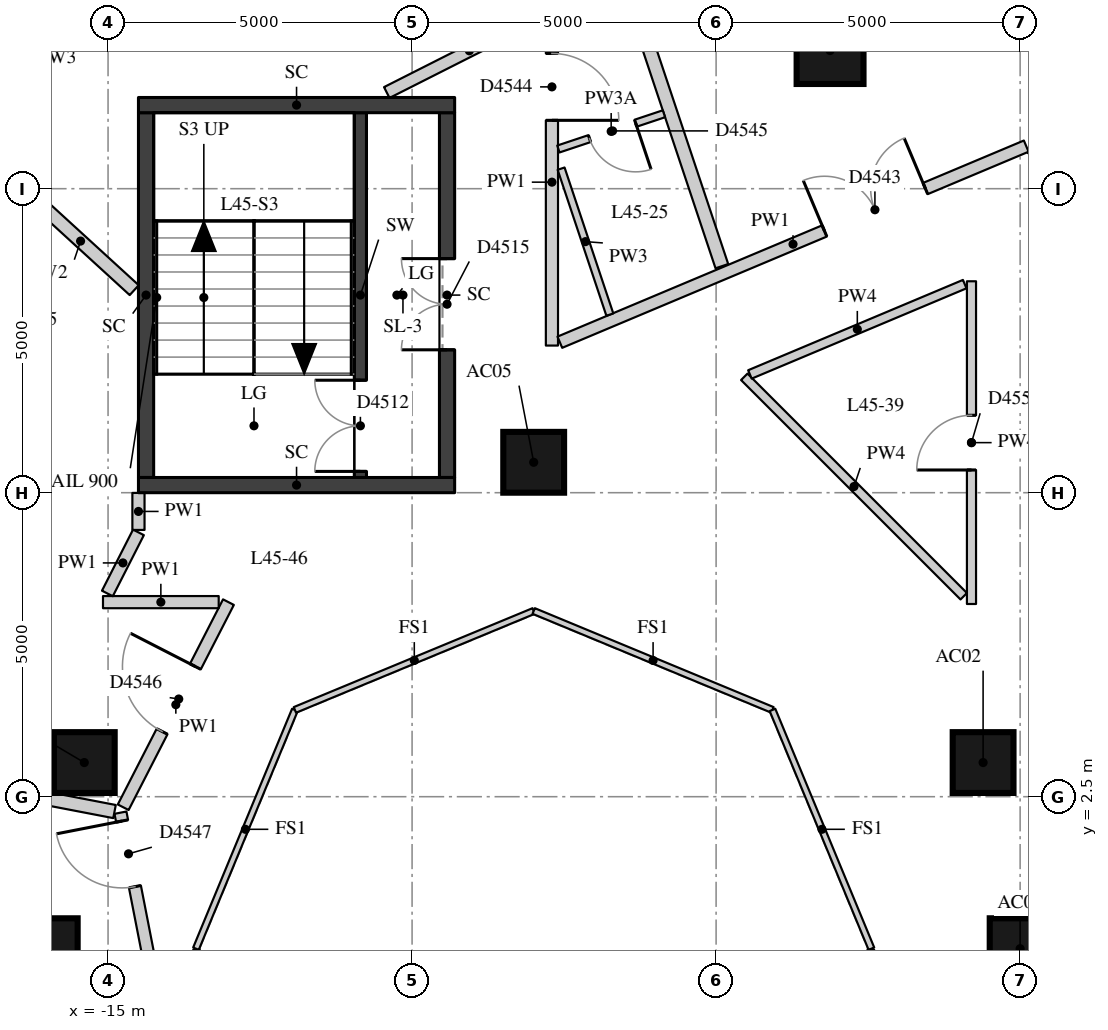
"""IFC4 building model, lengths in metres.
Left out: names, types, materials, properties, quantities, classifications, styles, units other than length and angle.
Written with IfcOpenShell. Run it as: python <this file> out.ifc"""

import sys

from ifc_helpers import new_model, si_unit, direction, frame, frame_2d, origin, origin_2d, place, context, subcontext, project, spatial, rectangle, extrude, element, fill, save


model = new_model("IFC4")
c1 = context("Model", 3, precision=1e-05, world=origin(), true_north=direction((0.0, 1.0)))
c2 = subcontext(c1, "Body", "Model", "MODEL_VIEW")
j1 = project(units=[si_unit("LENGTHUNIT", "METRE"), si_unit("PLANEANGLEUNIT", "RADIAN")], contexts=[c1])
p1 = place(None, origin())
s1 = spatial("IfcSite", under=j1, at=p1, CompositionType="ELEMENT")
p2 = place(p1, origin())
s2 = spatial("IfcBuilding", under=s1, at=p2, CompositionType="ELEMENT")
p3 = place(p2, frame((0.0, 0.0, 161.6)))
s3 = spatial("IfcBuildingStorey", under=s2, at=p3, CompositionType="ELEMENT", Elevation=161.6)
for number, where, z_axis, x_axis in (
    (1, (0.0, 0.0, 0.0), (0.0, 0.0, 1.0), (1.0, 0.0, 0.0)),
    (2, (-0.609, 3.062, 0.0), (0.0, 0.0, 1.0), (1.0, 0.0, 0.0)),
    (3, (-8.0, 8.0, 0.0), (0.0, 0.0, 1.0), (1.0, 0.0, 0.0)),
    (4, (-15.391, 3.062, 0.0), (0.0, 0.0, 1.0), (1.0, 0.0, 0.0)),
    (5, (-16.0, 0.0, 0.0), (0.0, 0.0, 1.0), (1.0, 0.0, 0.0)),
):
    element("IfcColumn", number, at=place(p3, frame(where, z_axis=z_axis, x_axis=x_axis)), inside=s3, PredefinedType="COLUMN", context=c2, shape_type="SweptSolid", body=[
        extrude(rectangle(XDim=1.0, YDim=1.0, at=origin_2d()), origin(), (0.0, 0.0, 1.0), 3.3),
    ])
p4 = place(p3, frame((-3.126, 14.772, 0.0), z_axis=(0.0, 0.0, 1.0), x_axis=(1.0, 0.0, 0.0)))
e6 = element("IfcColumn", 6, at=p4, inside=s3, PredefinedType="COLUMN", context=c2, shape_type="SweptSolid", body=[
    extrude(rectangle(XDim=1.1, YDim=1.1, at=origin_2d()), origin(), (0.0, 0.0, 1.0), 3.3),
])
p5 = place(p3, frame((-15.63, 16.639, 0.0), z_axis=(0.0, 0.0, 1.0), x_axis=(-0.737808755941, -0.675009807082, 0.0)))
e7 = element("IfcWall", 7, at=p5, inside=s3, PredefinedType="SOLIDWALL", context=c2, shape_type="SweptSolid", body=[
    extrude(rectangle(XDim=3.094, YDim=0.45, at=frame_2d((1.547, 0.0))), origin(), (0.0, 0.0, 1.0), 3.02),
])
p6 = place(p5, frame((0.747, 0.0, 0.4)))
e8 = element("IfcOpeningElement", 8, at=p6, cuts=e7, PredefinedType="OPENING", context=c2, shape_type="SweptSolid", body=[
    extrude(rectangle(XDim=1.6, YDim=1.75, at=frame_2d((0.8, 0.875))), frame((0.0, 0.235, 0.0), z_axis=(0.0, -1.0, 0.0), x_axis=(1.0, 0.0, 0.0)), (0.0, 0.0, 1.0), 0.47),
])
p7 = place(p3, frame((-10.85, 7.75, 0.0), z_axis=(0.0, 0.0, 1.0), x_axis=(0.0, 1.0, 0.0)))
e9 = element("IfcWall", 9, at=p7, inside=s3, PredefinedType="SHEAR", context=c2, shape_type="SweptSolid", body=[
    extrude(rectangle(XDim=6.0, YDim=0.2, at=frame_2d((3.0, 0.0))), origin(), (0.0, 0.0, 1.0), 3.02),
])
p8 = place(p7, frame((0.1, 0.0, 0.0)))
e10 = element("IfcOpeningElement", 10, at=p8, cuts=e9, PredefinedType="OPENING", context=c2, shape_type="SweptSolid", body=[
    extrude(rectangle(XDim=1.5, YDim=2.1, at=frame_2d((0.75, 1.05))), frame((0.0, 0.11, 0.0), z_axis=(0.0, -1.0, 0.0), x_axis=(1.0, 0.0, 0.0)), (0.0, 0.0, 1.0), 0.22),
])
p9 = place(p3, frame((-14.375, 7.75, -0.28), z_axis=(0.0, 0.0, 1.0), x_axis=(0.0, 1.0, 0.0)))
e11 = element("IfcWall", 11, at=p9, inside=s3, PredefinedType="SHEAR", context=c2, shape_type="SweptSolid", body=[
    extrude(rectangle(XDim=6.0, YDim=0.25, at=frame_2d((3.0, 0.0))), origin(), (0.0, 0.0, 1.0), 3.3),
])
p10 = place(p3, frame((-9.425, 7.75, -0.28), z_axis=(0.0, 0.0, 1.0), x_axis=(0.0, 1.0, 0.0)))
e12 = element("IfcWall", 12, at=p10, inside=s3, PredefinedType="SHEAR", context=c2, shape_type="SweptSolid", body=[
    extrude(rectangle(XDim=6.0, YDim=0.25, at=frame_2d((3.0, 0.0))), origin(), (0.0, 0.0, 1.0), 3.3),
])
p11 = place(p10, frame((2.1, 0.0, 0.28)))
e13 = element("IfcOpeningElement", 13, at=p11, cuts=e12, PredefinedType="OPENING", context=c2, shape_type="SweptSolid", body=[
    extrude(rectangle(XDim=1.5, YDim=2.1, at=frame_2d((0.75, 1.05))), frame((0.0, 0.135, 0.0), z_axis=(0.0, -1.0, 0.0), x_axis=(1.0, 0.0, 0.0)), (0.0, 0.0, 1.0), 0.27),
])
for number, where, z_axis, x_axis in (
    (14, (-14.5, 13.875, -0.28), (0.0, 0.0, 1.0), (1.0, 0.0, 0.0)),
    (15, (-14.5, 7.625, -0.28), (0.0, 0.0, 1.0), (1.0, 0.0, 0.0)),
):
    element("IfcWall", number, at=place(p3, frame(where, z_axis=z_axis, x_axis=x_axis)), inside=s3, PredefinedType="SHEAR", context=c2, shape_type="SweptSolid", body=[
        extrude(rectangle(XDim=5.2, YDim=0.25, at=frame_2d((2.6, 0.0))), origin(), (0.0, 0.0, 1.0), 3.3),
    ])
p12 = place(p3, frame((-13.268, -5.583, 0.0), z_axis=(0.0, 0.0, 1.0), x_axis=(-0.191747927029, 0.981444207523, 0.0)))
e16 = element("IfcWall", 16, at=p12, inside=s3, PredefinedType="PARTITIONING", context=c2, shape_type="SweptSolid", body=[
    extrude(rectangle(XDim=7.968, YDim=0.2, at=frame_2d((3.984, 0.0))), origin(), (0.0, 0.0, 1.0), 3.02),
])
p13 = place(p12, frame((6.728, 0.0, 0.0)))
e17 = element("IfcOpeningElement", 17, at=p13, cuts=e16, PredefinedType="OPENING", context=c2, shape_type="SweptSolid", body=[
    extrude(rectangle(XDim=1.1, YDim=2.1, at=frame_2d((0.55, 1.05))), frame((0.0, 0.11, 0.0), z_axis=(0.0, -1.0, 0.0), x_axis=(1.0, 0.0, 0.0)), (0.0, 0.0, 1.0), 0.22),
])
p14 = place(p3, frame((-14.751, 2.326, 0.0), z_axis=(0.0, 0.0, 1.0), x_axis=(0.456461745611, 0.889743038632, 0.0)))
e18 = element("IfcWall", 18, at=p14, inside=s3, PredefinedType="PARTITIONING", context=c2, shape_type="SweptSolid", body=[
    extrude(rectangle(XDim=3.792, YDim=0.2, at=frame_2d((1.896, 0.0))), origin(), (0.0, 0.0, 1.0), 3.02),
])
p15 = place(p14, frame((1.401, 0.0, 0.0)))
e19 = element("IfcOpeningElement", 19, at=p15, cuts=e18, PredefinedType="OPENING", context=c2, shape_type="SweptSolid", body=[
    extrude(rectangle(XDim=1.2, YDim=2.1, at=frame_2d((0.6, 1.05))), frame((0.0, 0.11, 0.0), z_axis=(0.0, -1.0, 0.0), x_axis=(1.0, 0.0, 0.0)), (0.0, 0.0, 1.0), 0.22),
])
p16 = place(p3, frame((-13.18, 5.7, 0.0), z_axis=(0.0, 0.0, 1.0), x_axis=(-1.0, 0.0, 0.0)))
e20 = element("IfcWall", 20, at=p16, inside=s3, PredefinedType="PARTITIONING", context=c2, shape_type="SweptSolid", body=[
    extrude(rectangle(XDim=1.903, YDim=0.2, at=frame_2d((0.952, 0.0))), origin(), (0.0, 0.0, 1.0), 3.02),
])
p17 = place(p3, frame((-15.011, 5.843, 0.0), z_axis=(0.0, 0.0, 1.0), x_axis=(0.453267091839, 0.891374749169, 0.0)))
e21 = element("IfcWall", 21, at=p17, inside=s3, PredefinedType="PARTITIONING", context=c2, shape_type="SweptSolid", body=[
    extrude(rectangle(XDim=1.127, YDim=0.2, at=frame_2d((0.564, 0.0))), origin(), (0.0, 0.0, 1.0), 3.02),
])
p18 = place(p3, frame((-14.5, 6.887, 0.0), z_axis=(0.0, 0.0, 1.0), x_axis=(0.0, 1.0, 0.0)))
e22 = element("IfcWall", 22, at=p18, inside=s3, PredefinedType="PARTITIONING", context=c2, shape_type="SweptSolid", body=[
    extrude(rectangle(XDim=0.609, YDim=0.2, at=frame_2d((0.304, 0.0))), origin(), (0.0, 0.0, 1.0), 3.02),
])
p19 = place(p3, frame((-10.416, 14.082, 0.0), z_axis=(0.0, 0.0, 1.0), x_axis=(0.892396808139, 0.451251522793, 0.0)))
e23 = element("IfcWall", 23, at=p19, inside=s3, PredefinedType="PARTITIONING", context=c2, shape_type="SweptSolid", body=[
    extrude(rectangle(XDim=3.044, YDim=0.2, at=frame_2d((1.522, 0.0))), origin(), (0.0, 0.0, 1.0), 3.02),
])
p20 = place(p3, frame((-7.7, 15.295, 0.0), z_axis=(0.0, 0.0, 1.0), x_axis=(0.0, -1.0, 0.0)))
e24 = element("IfcWall", 24, at=p20, inside=s3, PredefinedType="PARTITIONING", context=c2, shape_type="SweptSolid", body=[
    extrude(rectangle(XDim=5.375, YDim=0.2, at=frame_2d((2.688, 0.0))), origin(), (0.0, 0.0, 1.0), 3.02),
])
p21 = place(p20, frame((0.57, 0.0, 0.0)))
e25 = element("IfcOpeningElement", 25, at=p21, cuts=e24, PredefinedType="OPENING", context=c2, shape_type="SweptSolid", body=[
    extrude(rectangle(XDim=1.1, YDim=2.1, at=frame_2d((0.55, 1.05))), frame((0.0, 0.11, 0.0), z_axis=(0.0, -1.0, 0.0), x_axis=(1.0, 0.0, 0.0)), (0.0, 0.0, 1.0), 0.22),
])
p22 = place(p3, frame((-7.57, 9.975, 0.0), z_axis=(0.0, 0.0, 1.0), x_axis=(0.921815879705, 0.387628022624, 0.0)))
e26 = element("IfcWall", 26, at=p22, inside=s3, PredefinedType="PARTITIONING", context=c2, shape_type="SweptSolid", body=[
    extrude(rectangle(XDim=8.321, YDim=0.2, at=frame_2d((4.16, 0.0))), origin(), (0.0, 0.0, 1.0), 3.02),
])
p23 = place(p22, frame((4.721, 0.0, 0.0)))
e27 = element("IfcOpeningElement", 27, at=p23, cuts=e26, PredefinedType="OPENING", context=c2, shape_type="SweptSolid", body=[
    extrude(rectangle(XDim=1.8, YDim=2.1, at=frame_2d((0.9, 1.05))), frame((0.0, 0.11, 0.0), z_axis=(0.0, -1.0, 0.0), x_axis=(1.0, 0.0, 0.0)), (0.0, 0.0, 1.0), 0.22),
])
p24 = place(p3, frame((-0.8, 10.977, 0.0), z_axis=(0.0, 0.0, 1.0), x_axis=(0.0, -1.0, 0.0)))
e28 = element("IfcWall", 28, at=p24, inside=s3, PredefinedType="PARTITIONING", context=c2, shape_type="SweptSolid", body=[
    extrude(rectangle(XDim=5.308, YDim=0.15, at=frame_2d((2.654, 0.0))), origin(), (0.0, 0.0, 1.0), 3.02),
])
p25 = place(p24, frame((2.204, 0.0, 0.0)))
e29 = element("IfcOpeningElement", 29, at=p25, cuts=e28, PredefinedType="OPENING", context=c2, shape_type="SweptSolid", body=[
    extrude(rectangle(XDim=0.9, YDim=2.1, at=frame_2d((0.45, 1.05))), frame((0.0, 0.085, 0.0), z_axis=(0.0, -1.0, 0.0), x_axis=(1.0, 0.0, 0.0)), (0.0, 0.0, 1.0), 0.17),
])
p26 = place(p3, frame((-0.927, 5.797, 0.0), z_axis=(0.0, 0.0, 1.0), x_axis=(-0.707106781187, 0.707106781187, 0.0)))
e30 = element("IfcWall", 30, at=p26, inside=s3, PredefinedType="PARTITIONING", context=c2, shape_type="SweptSolid", body=[
    extrude(rectangle(XDim=5.104, YDim=0.15, at=frame_2d((2.552, 0.0))), origin(), (0.0, 0.0, 1.0), 3.02),
])
p27 = place(p3, frame((-4.444, 9.445, 0.0), z_axis=(0.0, 0.0, 1.0), x_axis=(0.921822351054, 0.387612632788, 0.0)))
e31 = element("IfcWall", 31, at=p27, inside=s3, PredefinedType="PARTITIONING", context=c2, shape_type="SweptSolid", body=[
    extrude(rectangle(XDim=3.832, YDim=0.15, at=frame_2d((1.916, 0.0))), origin(), (0.0, 0.0, 1.0), 3.02),
])
p28 = place(p3, frame((-7.683, 19.545, 0.0), z_axis=(0.0, 0.0, 1.0), x_axis=(0.316703700313, -0.948524520615, 0.0)))
e32 = element("IfcWall", 32, at=p28, inside=s3, PredefinedType="PARTITIONING", context=c2, shape_type="SweptSolid", body=[
    extrude(rectangle(XDim=8.771, YDim=0.22, at=frame_2d((4.385, 0.0))), origin(), (0.0, 0.0, 1.0), 3.02),
])
p29 = place(p3, frame((-16.334, 12.445, 0.0), z_axis=(0.0, 0.0, 1.0), x_axis=(0.737857346278, -0.674956692347, 0.0)))
e33 = element("IfcWall", 33, at=p29, inside=s3, PredefinedType="PARTITIONING", context=c2, shape_type="SweptSolid", body=[
    extrude(rectangle(XDim=2.391, YDim=0.22, at=frame_2d((1.195, 0.0))), origin(), (0.0, 0.0, 1.0), 3.02),
])
p30 = place(p3, frame((-20.932, 3.417, 0.0), z_axis=(0.0, 0.0, 1.0), x_axis=(0.9820075798, -0.188841502892, 0.0)))
e34 = element("IfcWall", 34, at=p30, inside=s3, PredefinedType="PARTITIONING", context=c2, shape_type="SweptSolid", body=[
    extrude(rectangle(XDim=6.149, YDim=0.22, at=frame_2d((3.074, 0.0))), origin(), (0.0, 0.0, 1.0), 2.57),
])
p31 = place(p3, frame((-6.748, 10.429, 0.0), z_axis=(0.0, 0.0, 1.0), x_axis=(-0.316690754737, 0.948528842927, 0.0)))
e35 = element("IfcWall", 35, at=p31, inside=s3, PredefinedType="PARTITIONING", context=c2, shape_type="SweptSolid", body=[
    extrude(rectangle(XDim=2.531, YDim=0.12, at=frame_2d((1.266, 0.0))), origin(), (0.0, 0.0, 1.0), 3.02),
])
p32 = place(p3, frame((-7.594, 13.153, 0.0), z_axis=(0.0, 0.0, 1.0), x_axis=(0.948563158378, 0.316587957079, 0.0)))
e36 = element("IfcWall", 36, at=p32, inside=s3, PredefinedType="PARTITIONING", context=c2, shape_type="SweptSolid", body=[
    extrude(rectangle(XDim=1.83, YDim=0.12, at=frame_2d((0.915, 0.0))), origin(), (0.0, 0.0, 1.0), 2.57),
])
p33 = place(p32, frame((0.54, 0.0, 0.0)))
e37 = element("IfcOpeningElement", 37, at=p33, cuts=e36, PredefinedType="OPENING", context=c2, shape_type="SweptSolid", body=[
    extrude(rectangle(XDim=0.8, YDim=2.1, at=frame_2d((0.4, 1.05))), frame((0.0, 0.07, 0.0), z_axis=(0.0, -1.0, 0.0), x_axis=(1.0, 0.0, 0.0)), (0.0, 0.0, 1.0), 0.14),
])
for number, where, z_axis, x_axis in (
    (38, (-2.446, 0.0, 0.0), (0.0, 0.0, 1.0), (-0.383, -0.924, 0.0)),
    (39, (-11.927, -3.927, 0.0), (0.0, 0.0, 1.0), (-0.383, 0.924, 0.0)),
    (40, (-13.554, 0.0, 0.0), (0.0, 0.0, 1.0), (0.383, 0.924, 0.0)),
    (41, (-11.927, 3.927, 0.0), (0.0, 0.0, 1.0), (0.924, 0.383, 0.0)),
    (42, (-8.0, 5.554, 0.0), (0.0, 0.0, 1.0), (0.924, -0.383, 0.0)),
    (43, (-4.073, 3.927, 0.0), (0.0, 0.0, 1.0), (0.383, -0.924, 0.0)),
):
    element("IfcWall", number, at=place(p3, frame(where, z_axis=z_axis, x_axis=x_axis)), inside=s3, PredefinedType="PARTITIONING", context=c2, shape_type="SweptSolid", body=[
        extrude(rectangle(XDim=4.251, YDim=0.1, at=frame_2d((2.125, 0.0))), origin(), (0.0, 0.0, 1.0), 3.02),
    ])
p34 = place(p8, origin())
e44 = element("IfcDoor", 44, at=p34, inside=s3, OperationType="DOUBLE_DOOR_SINGLE_SWING", PredefinedType="DOOR", context=c2, shape_type="SweptSolid", body=[
    extrude(rectangle(XDim=1.5, YDim=2.1, at=frame_2d((0.75, 1.05))), frame((0.0, 0.025, 0.0), z_axis=(0.0, -1.0, 0.0), x_axis=(1.0, 0.0, 0.0)), (0.0, 0.0, 1.0), 0.05),
])
fill(e10, e44)
p35 = place(p11, origin())
e45 = element("IfcDoor", 45, at=p35, inside=s3, OperationType="DOUBLE_DOOR_SINGLE_SWING", PredefinedType="DOOR", context=c2, shape_type="SweptSolid", body=[
    extrude(rectangle(XDim=1.5, YDim=2.1, at=frame_2d((0.75, 1.05))), frame((0.0, 0.025, 0.0), z_axis=(0.0, -1.0, 0.0), x_axis=(1.0, 0.0, 0.0)), (0.0, 0.0, 1.0), 0.05),
])
fill(e13, e45)
p36 = place(p23, origin())
e46 = element("IfcDoor", 46, at=p36, inside=s3, OperationType="DOUBLE_DOOR_SINGLE_SWING", PredefinedType="DOOR", context=c2, shape_type="SweptSolid", body=[
    extrude(rectangle(XDim=1.8, YDim=2.1, at=frame_2d((0.9, 1.05))), frame((0.0, 0.025, 0.0), z_axis=(0.0, -1.0, 0.0), x_axis=(1.0, 0.0, 0.0)), (0.0, 0.0, 1.0), 0.05),
])
fill(e27, e46)
p37 = place(p21, origin())
e47 = element("IfcDoor", 47, at=p37, inside=s3, OperationType="SINGLE_SWING_RIGHT", PredefinedType="DOOR", context=c2, shape_type="SweptSolid", body=[
    extrude(rectangle(XDim=1.1, YDim=2.1, at=frame_2d((0.55, 1.05))), frame((0.0, 0.025, 0.0), z_axis=(0.0, -1.0, 0.0), x_axis=(1.0, 0.0, 0.0)), (0.0, 0.0, 1.0), 0.05),
])
fill(e25, e47)
p38 = place(p33, origin())
e48 = element("IfcDoor", 48, at=p38, inside=s3, OperationType="SINGLE_SWING_LEFT", PredefinedType="DOOR", context=c2, shape_type="SweptSolid", body=[
    extrude(rectangle(XDim=0.8, YDim=2.1, at=frame_2d((0.4, 1.05))), frame((0.0, 0.025, 0.0), z_axis=(0.0, -1.0, 0.0), x_axis=(1.0, 0.0, 0.0)), (0.0, 0.0, 1.0), 0.05),
])
fill(e37, e48)
p39 = place(p15, origin())
e49 = element("IfcDoor", 49, at=p39, inside=s3, OperationType="SINGLE_SWING_RIGHT", PredefinedType="DOOR", context=c2, shape_type="SweptSolid", body=[
    extrude(rectangle(XDim=1.2, YDim=2.1, at=frame_2d((0.6, 1.05))), frame((0.0, 0.025, 0.0), z_axis=(0.0, -1.0, 0.0), x_axis=(1.0, 0.0, 0.0)), (0.0, 0.0, 1.0), 0.05),
])
fill(e19, e49)
p40 = place(p13, origin())
e50 = element("IfcDoor", 50, at=p40, inside=s3, OperationType="SINGLE_SWING_RIGHT", PredefinedType="DOOR", context=c2, shape_type="SweptSolid", body=[
    extrude(rectangle(XDim=1.1, YDim=2.1, at=frame_2d((0.55, 1.05))), frame((0.0, 0.025, 0.0), z_axis=(0.0, -1.0, 0.0), x_axis=(1.0, 0.0, 0.0)), (0.0, 0.0, 1.0), 0.05),
])
fill(e17, e50)
p41 = place(p25, origin())
e51 = element("IfcDoor", 51, at=p41, inside=s3, OperationType="SINGLE_SWING_LEFT", PredefinedType="DOOR", context=c2, shape_type="SweptSolid", body=[
    extrude(rectangle(XDim=0.9, YDim=2.1, at=frame_2d((0.45, 1.05))), frame((0.0, 0.025, 0.0), z_axis=(0.0, -1.0, 0.0), x_axis=(1.0, 0.0, 0.0)), (0.0, 0.0, 1.0), 0.05),
])
fill(e29, e51)
save(model, sys.argv[1])
